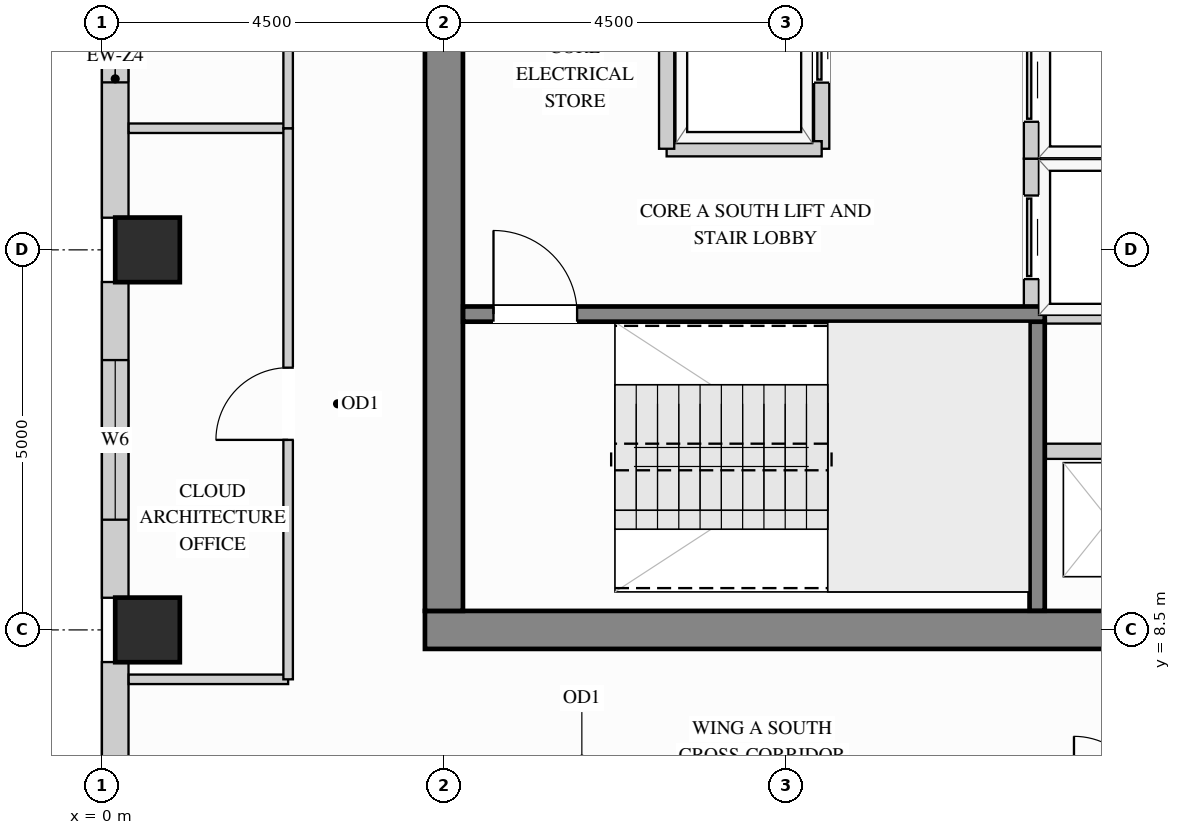
"""IFC4 building model, lengths in metres.
Left out: names, types, materials, properties, quantities, classifications, styles, units other than length and angle.
Written with IfcOpenShell. Run it as: python <this file> out.ifc"""

import sys

from ifc_helpers import new_model, si_unit, direction, frame, frame_2d, origin, origin_2d, place, context, subcontext, project, spatial, rectangle, extrude, source, transform, mapped, element, fill, save


model = new_model("IFC4")
c1 = context("Model", 3, precision=1e-05, world=origin(), true_north=direction((0.0, 1.0)))
c2 = subcontext(c1, "Body", "Model", "MODEL_VIEW")
j1 = project(units=[si_unit("LENGTHUNIT", "METRE"), si_unit("PLANEANGLEUNIT", "RADIAN")], contexts=[c1])
p1 = place(None, origin())
s1 = spatial("IfcSite", under=j1, at=p1, CompositionType="ELEMENT")
p2 = place(p1, origin())
s2 = spatial("IfcBuilding", under=s1, at=p2, CompositionType="ELEMENT")
p3 = place(p2, frame((0.0, 0.0, 273.6)))
s3 = spatial("IfcBuildingStorey", under=s2, at=p3, CompositionType="ELEMENT", Elevation=273.6)
m1 = source(origin(), c2, "Body", "SweptSolid", [
    extrude(rectangle(XDim=0.85, YDim=0.85, at=origin_2d()), origin(), (0.0, 0.0, 1.0), 3.37),
])
for number, where, z_axis, x_axis in (
    (1, (0.6, 13.5, 0.0), (0.0, 0.0, 1.0), (1.0, 0.0, 0.0)),
    (2, (0.6, 8.5, 0.0), (0.0, 0.0, 1.0), (1.0, 0.0, 0.0)),
):
    element("IfcColumn", number, at=place(p3, frame(where, z_axis=z_axis, x_axis=x_axis)), inside=s3, PredefinedType="COLUMN", context=c2, shape_type="MappedRepresentation", body=[
        mapped(m1, transform((0.0, 0.0, 0.0), x_axis=(1.0, 0.0, 0.0), y_axis=(0.0, 1.0, 0.0), z_axis=(0.0, 0.0, 1.0))),
    ])
m2 = source(origin(), c2, "Body", "SweptSolid", [
    extrude(rectangle(XDim=10.5, YDim=0.5, at=frame_2d((5.25, 0.0))), origin(), (0.0, 0.0, 1.0), 3.37),
])
p4 = place(p3, frame((4.25, 8.5, 0.0), z_axis=(0.0, 0.0, 1.0), x_axis=(1.0, 0.0, 0.0)))
e3 = element("IfcWall", 3, at=p4, inside=s3, PredefinedType="SHEAR", context=c2, shape_type="MappedRepresentation", body=[
    mapped(m2, transform((0.0, 0.0, 0.0), x_axis=(1.0, 0.0, 0.0), y_axis=(0.0, 1.0, 0.0), z_axis=(0.0, 0.0, 1.0))),
])
m3 = source(origin(), c2, "Body", "SweptSolid", [
    extrude(rectangle(XDim=20.5, YDim=0.5, at=frame_2d((10.25, 0.0))), origin(), (0.0, 0.0, 1.0), 3.37),
])
p5 = place(p3, frame((4.5, 8.75, 0.0), z_axis=(0.0, 0.0, 1.0), x_axis=(0.0, 1.0, 0.0)))
e4 = element("IfcWall", 4, at=p5, inside=s3, PredefinedType="SHEAR", context=c2, shape_type="MappedRepresentation", body=[
    mapped(m3, transform((0.0, 0.0, 0.0), x_axis=(1.0, 0.0, 0.0), y_axis=(0.0, 1.0, 0.0), z_axis=(0.0, 0.0, 1.0))),
])
p6 = place(p3, frame((0.175, 17.577, 0.0), z_axis=(0.0, 0.0, 1.0), x_axis=(0.0, -1.0, 0.0)))
e5 = element("IfcWall", 5, at=p6, inside=s3, PredefinedType="SOLIDWALL", context=c2, shape_type="SweptSolid", body=[
    extrude(rectangle(XDim=3.654, YDim=0.35, at=frame_2d((1.827, 0.0))), origin(), (0.0, 0.0, 1.0), 3.355),
])
p7 = place(p6, frame((0.674, 0.0, 0.78)))
e6 = element("IfcOpeningElement", 6, at=p7, cuts=e5, PredefinedType="OPENING", context=c2, shape_type="SweptSolid", body=[
    extrude(rectangle(XDim=1.2, YDim=2.25, at=frame_2d((0.6, 1.125))), frame((0.0, 0.185, 0.0), z_axis=(0.0, -1.0, 0.0), x_axis=(1.0, 0.0, 0.0)), (0.0, 0.0, 1.0), 0.37),
])
p8 = place(p3, frame((0.175, 13.077, 0.0), z_axis=(0.0, 0.0, 1.0), x_axis=(0.0, -1.0, 0.0)))
e7 = element("IfcWall", 7, at=p8, inside=s3, PredefinedType="SOLIDWALL", context=c2, shape_type="SweptSolid", body=[
    extrude(rectangle(XDim=4.154, YDim=0.35, at=frame_2d((2.077, 0.0))), origin(), (0.0, 0.0, 1.0), 3.355),
])
p9 = place(p8, frame((1.027, 0.0, 0.78)))
e8 = element("IfcOpeningElement", 8, at=p9, cuts=e7, PredefinedType="OPENING", context=c2, shape_type="SweptSolid", body=[
    extrude(rectangle(XDim=2.1, YDim=2.25, at=frame_2d((1.05, 1.125))), frame((0.0, 0.185, 0.0), z_axis=(0.0, -1.0, 0.0), x_axis=(1.0, 0.0, 0.0)), (0.0, 0.0, 1.0), 0.37),
])
p10 = place(p3, frame((0.175, 8.077, 0.0), z_axis=(0.0, 0.0, 1.0), x_axis=(0.0, -1.0, 0.0)))
e9 = element("IfcWall", 9, at=p10, inside=s3, PredefinedType="SOLIDWALL", context=c2, shape_type="SweptSolid", body=[
    extrude(rectangle(XDim=4.154, YDim=0.35, at=frame_2d((2.077, 0.0))), origin(), (0.0, 0.0, 1.0), 3.355),
])
p11 = place(p10, frame((2.406, 0.0, 0.78)))
e10 = element("IfcOpeningElement", 10, at=p11, cuts=e9, PredefinedType="OPENING", context=c2, shape_type="SweptSolid", body=[
    extrude(rectangle(XDim=1.2, YDim=2.25, at=frame_2d((0.6, 1.125))), frame((0.0, 0.185, 0.0), z_axis=(0.0, -1.0, 0.0), x_axis=(1.0, 0.0, 0.0)), (0.0, 0.0, 1.0), 0.37),
])
m4 = source(origin(), c2, "Body", "SweptSolid", [
    extrude(rectangle(XDim=2.098, YDim=0.125, at=frame_2d((1.049, 0.0))), origin(), (0.0, 0.0, 1.0), 3.355),
])
for number, where, z_axis, x_axis in (
    (11, (0.352, 7.85, 0.0), (0.0, 0.0, 1.0), (1.0, 0.0, 0.0)),
    (12, (0.352, 15.1, 0.0), (0.0, 0.0, 1.0), (1.0, 0.0, 0.0)),
):
    element("IfcWall", number, at=place(p3, frame(where, z_axis=z_axis, x_axis=x_axis)), inside=s3, PredefinedType="PARTITIONING", context=c2, shape_type="MappedRepresentation", body=[
        mapped(m4, transform((0.0, 0.0, 0.0), x_axis=(1.0, 0.0, 0.0), y_axis=(0.0, 1.0, 0.0), z_axis=(0.0, 0.0, 1.0))),
    ])
p12 = place(p3, frame((2.45, 7.85, 0.0), z_axis=(0.0, 0.0, 1.0), x_axis=(0.0, 1.0, 0.0)))
e13 = element("IfcWall", 13, at=p12, inside=s3, PredefinedType="PARTITIONING", context=c2, shape_type="SweptSolid", body=[
    extrude(rectangle(XDim=7.25, YDim=0.125, at=frame_2d((3.625, 0.0))), origin(), (0.0, 0.0, 1.0), 3.355),
])
p13 = place(p12, frame((3.15, 0.0, 0.0)))
e14 = element("IfcOpeningElement", 14, at=p13, cuts=e13, PredefinedType="OPENING", context=c2, shape_type="SweptSolid", body=[
    extrude(rectangle(XDim=0.95, YDim=2.15, at=frame_2d((0.475, 1.075))), frame((0.0, 0.073, 0.0), z_axis=(0.0, -1.0, 0.0), x_axis=(1.0, 0.0, 0.0)), (0.0, 0.0, 1.0), 0.145),
])
p14 = place(p3, frame((2.45, 15.1, 0.0), z_axis=(0.0, 0.0, 1.0), x_axis=(0.0, 1.0, 0.0)))
e15 = element("IfcWall", 15, at=p14, inside=s3, PredefinedType="PARTITIONING", context=c2, shape_type="SweptSolid", body=[
    extrude(rectangle(XDim=7.5, YDim=0.125, at=frame_2d((3.75, 0.0))), origin(), (0.0, 0.0, 1.0), 3.355),
])
p15 = place(p14, frame((3.275, 0.0, 0.0)))
e16 = element("IfcOpeningElement", 16, at=p15, cuts=e15, PredefinedType="OPENING", context=c2, shape_type="SweptSolid", body=[
    extrude(rectangle(XDim=0.95, YDim=2.15, at=frame_2d((0.475, 1.075))), frame((0.0, 0.073, 0.0), z_axis=(0.0, -1.0, 0.0), x_axis=(1.0, 0.0, 0.0)), (0.0, 0.0, 1.0), 0.145),
])
m5 = source(origin(), c2, "Body", "SweptSolid", [
    extrude(rectangle(XDim=1.63, YDim=0.2, at=frame_2d((0.815, 0.0))), origin(), (0.0, 0.0, 1.0), 3.355),
])
p16 = place(p3, frame((12.42, 10.85, 0.0), z_axis=(0.0, 0.0, 1.0), x_axis=(1.0, 0.0, 0.0)))
e17 = element("IfcWall", 17, at=p16, inside=s3, PredefinedType="PARTITIONING", context=c2, shape_type="MappedRepresentation", body=[
    mapped(m5, transform((0.0, 0.0, 0.0), x_axis=(1.0, 0.0, 0.0), y_axis=(0.0, 1.0, 0.0), z_axis=(0.0, 0.0, 1.0))),
])
m6 = source(origin(), c2, "Body", "SweptSolid", [
    extrude(rectangle(XDim=1.99, YDim=0.2, at=frame_2d((0.995, 0.0))), origin(), (0.0, 0.0, 1.0), 3.355),
])
for number, where, z_axis, x_axis in (
    (18, (12.23, 14.7, 0.0), (0.0, 0.0, 1.0), (1.0, 0.0, 0.0)),
    (19, (12.23, 12.63, 0.0), (0.0, 0.0, 1.0), (1.0, 0.0, 0.0)),
):
    element("IfcWall", number, at=place(p3, frame(where, z_axis=z_axis, x_axis=x_axis)), inside=s3, PredefinedType="PARTITIONING", context=c2, shape_type="MappedRepresentation", body=[
        mapped(m6, transform((0.0, 0.0, 0.0), x_axis=(1.0, 0.0, 0.0), y_axis=(0.0, 1.0, 0.0), z_axis=(0.0, 0.0, 1.0))),
    ])
p17 = place(p3, frame((12.23, 12.63, 0.0), z_axis=(0.0, 0.0, 1.0), x_axis=(0.0, 1.0, 0.0)))
e20 = element("IfcWall", 20, at=p17, inside=s3, PredefinedType="PARTITIONING", context=c2, shape_type="SweptSolid", body=[
    extrude(rectangle(XDim=2.07, YDim=0.2, at=frame_2d((1.035, 0.0))), origin(), (0.0, 0.0, 1.0), 3.355),
])
p18 = place(p17, frame((0.485, 0.0, 0.0)))
e21 = element("IfcOpeningElement", 21, at=p18, cuts=e20, PredefinedType="OPENING", context=c2, shape_type="SweptSolid", body=[
    extrude(rectangle(XDim=1.1, YDim=2.2, at=frame_2d((0.55, 1.1))), frame((0.0, 0.11, 0.0), z_axis=(0.0, -1.0, 0.0), x_axis=(1.0, 0.0, 0.0)), (0.0, 0.0, 1.0), 0.22),
])
p19 = place(p3, frame((12.23, 14.7, 0.0), z_axis=(0.0, 0.0, 1.0), x_axis=(0.0, 1.0, 0.0)))
e22 = element("IfcWall", 22, at=p19, inside=s3, PredefinedType="PARTITIONING", context=c2, shape_type="SweptSolid", body=[
    extrude(rectangle(XDim=2.07, YDim=0.2, at=frame_2d((1.035, 0.0))), origin(), (0.0, 0.0, 1.0), 3.355),
])
p20 = place(p19, frame((0.485, 0.0, 0.0)))
e23 = element("IfcOpeningElement", 23, at=p20, cuts=e22, PredefinedType="OPENING", context=c2, shape_type="SweptSolid", body=[
    extrude(rectangle(XDim=1.1, YDim=2.2, at=frame_2d((0.55, 1.1))), frame((0.0, 0.11, 0.0), z_axis=(0.0, -1.0, 0.0), x_axis=(1.0, 0.0, 0.0)), (0.0, 0.0, 1.0), 0.22),
])
p21 = place(p3, frame((9.47, 14.83, 0.0), z_axis=(0.0, 0.0, 1.0), x_axis=(0.0, 1.0, 0.0)))
e24 = element("IfcWall", 24, at=p21, inside=s3, PredefinedType="PARTITIONING", context=c2, shape_type="SweptSolid", body=[
    extrude(rectangle(XDim=2.84, YDim=0.2, at=frame_2d((1.42, 0.0))), origin(), (0.0, 0.0, 1.0), 3.355),
])
p22 = place(p21, frame((0.87, 0.0, 0.0)))
e25 = element("IfcOpeningElement", 25, at=p22, cuts=e24, PredefinedType="OPENING", context=c2, shape_type="SweptSolid", body=[
    extrude(rectangle(XDim=1.1, YDim=2.2, at=frame_2d((0.55, 1.1))), frame((0.0, 0.11, 0.0), z_axis=(0.0, -1.0, 0.0), x_axis=(1.0, 0.0, 0.0)), (0.0, 0.0, 1.0), 0.22),
])
m7 = source(origin(), c2, "Body", "SweptSolid", [
    extrude(rectangle(XDim=2.04, YDim=0.2, at=frame_2d((1.02, 0.0))), origin(), (0.0, 0.0, 1.0), 3.355),
])
p23 = place(p3, frame((7.43, 14.83, 0.0), z_axis=(0.0, 0.0, 1.0), x_axis=(1.0, 0.0, 0.0)))
e26 = element("IfcWall", 26, at=p23, inside=s3, PredefinedType="PARTITIONING", context=c2, shape_type="MappedRepresentation", body=[
    mapped(m7, transform((0.0, 0.0, 0.0), x_axis=(1.0, 0.0, 0.0), y_axis=(0.0, 1.0, 0.0), z_axis=(0.0, 0.0, 1.0))),
])
m8 = source(origin(), c2, "Body", "SweptSolid", [
    extrude(rectangle(XDim=2.84, YDim=0.2, at=frame_2d((1.42, 0.0))), origin(), (0.0, 0.0, 1.0), 3.355),
])
p24 = place(p3, frame((7.43, 14.83, 0.0), z_axis=(0.0, 0.0, 1.0), x_axis=(0.0, 1.0, 0.0)))
e27 = element("IfcWall", 27, at=p24, inside=s3, PredefinedType="PARTITIONING", context=c2, shape_type="MappedRepresentation", body=[
    mapped(m8, transform((0.0, 0.0, 0.0), x_axis=(1.0, 0.0, 0.0), y_axis=(0.0, 1.0, 0.0), z_axis=(0.0, 0.0, 1.0))),
])
m9 = source(origin(), c2, "Body", "SweptSolid", [
    extrude(rectangle(XDim=3.803, YDim=0.2, at=frame_2d((1.901, 0.0))), origin(), (0.0, 0.0, 1.0), 3.37),
])
p25 = place(p3, frame((12.305, 8.752, 0.0), z_axis=(0.0, 0.0, 1.0), x_axis=(0.0, 1.0, 0.0)))
e28 = element("IfcWall", 28, at=p25, inside=s3, PredefinedType="SHEAR", context=c2, shape_type="MappedRepresentation", body=[
    mapped(m9, transform((0.0, 0.0, 0.0), x_axis=(1.0, 0.0, 0.0), y_axis=(0.0, 1.0, 0.0), z_axis=(0.0, 0.0, 1.0))),
])
p26 = place(p3, frame((4.752, 12.655, 0.0), z_axis=(0.0, 0.0, 1.0), x_axis=(1.0, 0.0, 0.0)))
e29 = element("IfcWall", 29, at=p26, inside=s3, PredefinedType="SHEAR", context=c2, shape_type="SweptSolid", body=[
    extrude(rectangle(XDim=7.653, YDim=0.2, at=frame_2d((3.827, 0.0))), origin(), (0.0, 0.0, 1.0), 3.37),
])
p27 = place(p26, frame((0.4, 0.0, 0.0)))
e30 = element("IfcOpeningElement", 30, at=p27, cuts=e29, PredefinedType="OPENING", context=c2, shape_type="SweptSolid", body=[
    extrude(rectangle(XDim=1.1, YDim=2.15, at=frame_2d((0.55, 1.075))), frame((0.0, 0.11, 0.0), z_axis=(0.0, -1.0, 0.0), x_axis=(1.0, 0.0, 0.0)), (0.0, 0.0, 1.0), 0.22),
])
m10 = source(origin(), c2, "Body", "SweptSolid", [
    extrude(rectangle(XDim=1.1, YDim=2.2, at=frame_2d((0.55, 1.1))), frame((0.0, 0.025, 0.0), z_axis=(0.0, -1.0, 0.0), x_axis=(1.0, 0.0, 0.0)), (0.0, 0.0, 1.0), 0.05),
])
p28 = place(p18, origin())
e31 = element("IfcDoor", 31, at=p28, inside=s3, OperationType="SLIDING_TO_LEFT", PredefinedType="DOOR", context=c2, shape_type="MappedRepresentation", body=[
    mapped(m10, transform((0.0, 0.0, 0.0), x_axis=(1.0, 0.0, 0.0), y_axis=(0.0, 1.0, 0.0), z_axis=(0.0, 0.0, 1.0))),
])
fill(e21, e31)
p29 = place(p20, origin())
e32 = element("IfcDoor", 32, at=p29, inside=s3, OperationType="SLIDING_TO_LEFT", PredefinedType="DOOR", context=c2, shape_type="MappedRepresentation", body=[
    mapped(m10, transform((0.0, 0.0, 0.0), x_axis=(1.0, 0.0, 0.0), y_axis=(0.0, 1.0, 0.0), z_axis=(0.0, 0.0, 1.0))),
])
fill(e23, e32)
p30 = place(p22, origin())
e33 = element("IfcDoor", 33, at=p30, inside=s3, OperationType="SLIDING_TO_LEFT", PredefinedType="DOOR", context=c2, shape_type="MappedRepresentation", body=[
    mapped(m10, transform((0.0, 0.0, 0.0), x_axis=(1.0, 0.0, 0.0), y_axis=(0.0, 1.0, 0.0), z_axis=(0.0, 0.0, 1.0))),
])
fill(e25, e33)
m11 = source(origin(), c2, "Body", "SweptSolid", [
    extrude(rectangle(XDim=0.95, YDim=2.15, at=frame_2d((0.475, 1.075))), frame((0.0, 0.025, 0.0), z_axis=(0.0, -1.0, 0.0), x_axis=(1.0, 0.0, 0.0)), (0.0, 0.0, 1.0), 0.05),
])
p31 = place(p13, origin())
e34 = element("IfcDoor", 34, at=p31, inside=s3, OperationType="SINGLE_SWING_LEFT", PredefinedType="DOOR", context=c2, shape_type="MappedRepresentation", body=[
    mapped(m11, transform((0.0, 0.0, 0.0), x_axis=(1.0, 0.0, 0.0), y_axis=(0.0, 1.0, 0.0), z_axis=(0.0, 0.0, 1.0))),
])
fill(e14, e34)
m12 = source(origin(), c2, "Body", "SweptSolid", [
    extrude(rectangle(XDim=1.1, YDim=2.15, at=frame_2d((0.55, 1.075))), frame((0.0, 0.025, 0.0), z_axis=(0.0, -1.0, 0.0), x_axis=(1.0, 0.0, 0.0)), (0.0, 0.0, 1.0), 0.05),
])
p32 = place(p27, origin())
e35 = element("IfcDoor", 35, at=p32, inside=s3, OperationType="SINGLE_SWING_LEFT", PredefinedType="DOOR", context=c2, shape_type="MappedRepresentation", body=[
    mapped(m12, transform((0.0, 0.0, 0.0), x_axis=(1.0, 0.0, 0.0), y_axis=(0.0, 1.0, 0.0), z_axis=(0.0, 0.0, 1.0))),
])
fill(e30, e35)
m13 = source(origin(), c2, "Body", "SweptSolid", [
    extrude(rectangle(XDim=1.2, YDim=2.25, at=frame_2d((0.6, 1.125))), frame((0.0, 0.03, 0.0), z_axis=(0.0, -1.0, 0.0), x_axis=(1.0, 0.0, 0.0)), (0.0, 0.0, 1.0), 0.06),
])
p33 = place(p7, origin())
e36 = element("IfcWindow", 36, at=p33, inside=s3, PartitioningType="SINGLE_PANEL", PredefinedType="WINDOW", context=c2, shape_type="MappedRepresentation", body=[
    mapped(m13, transform((0.0, 0.0, 0.0), x_axis=(1.0, 0.0, 0.0), y_axis=(0.0, 1.0, 0.0), z_axis=(0.0, 0.0, 1.0))),
])
fill(e6, e36)
m14 = source(origin(), c2, "Body", "SweptSolid", [
    extrude(rectangle(XDim=2.1, YDim=2.25, at=frame_2d((1.05, 1.125))), frame((0.0, 0.03, 0.0), z_axis=(0.0, -1.0, 0.0), x_axis=(1.0, 0.0, 0.0)), (0.0, 0.0, 1.0), 0.06),
])
p34 = place(p9, origin())
e37 = element("IfcWindow", 37, at=p34, inside=s3, PartitioningType="SINGLE_PANEL", PredefinedType="WINDOW", context=c2, shape_type="MappedRepresentation", body=[
    mapped(m14, transform((0.0, 0.0, 0.0), x_axis=(1.0, 0.0, 0.0), y_axis=(0.0, 1.0, 0.0), z_axis=(0.0, 0.0, 1.0))),
])
fill(e8, e37)
save(model, sys.argv[1])
